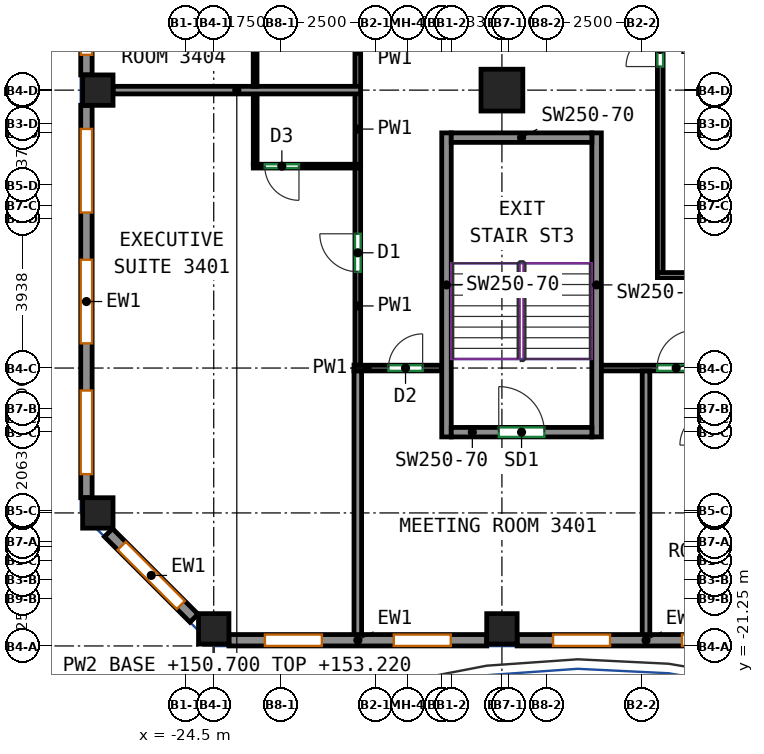
"""IFC4 building model, lengths in metres.
Left out: names, types, materials, properties, quantities, classifications, styles, units other than length and angle.
Written with IfcOpenShell. Run it as: python <this file> out.ifc"""

import sys

from ifc_helpers import new_model, si_unit, direction, frame, frame_2d, origin, origin_2d, place, context, subcontext, project, spatial, rectangle, extrude, source, transform, mapped, element, fill, save


model = new_model("IFC4")
c1 = context("Model", 3, precision=1e-05, world=origin(), true_north=direction((0.0, 1.0)))
c2 = subcontext(c1, "Body", "Model", "MODEL_VIEW")
j1 = project(units=[si_unit("LENGTHUNIT", "METRE"), si_unit("PLANEANGLEUNIT", "RADIAN")], contexts=[c1])
p1 = place(None, origin())
s1 = spatial("IfcSite", under=j1, at=p1, CompositionType="ELEMENT")
p2 = place(p1, origin())
s2 = spatial("IfcBuilding", under=s1, at=p2, CompositionType="ELEMENT")
p3 = place(p2, frame((0.0, 0.0, 150.7)))
s3 = spatial("IfcBuildingStorey", under=s2, at=p3, CompositionType="ELEMENT", Elevation=150.7)
m1 = source(origin(), c2, "Body", "SweptSolid", [
    extrude(rectangle(XDim=0.8, YDim=0.8, at=origin_2d()), origin(), (0.0, 0.0, 1.0), 3.12),
])
for number, where, z_axis, x_axis in (
    (1, (-26.8, -17.75, 0.0), (0.0, 0.0, 1.0), (1.0, 0.0, 0.0)),
    (2, (-26.8, -6.625, 0.0), (0.0, 0.0, 1.0), (1.0, 0.0, 0.0)),
    (3, (-23.75, -20.8, 0.0), (0.0, 0.0, 1.0), (1.0, 0.0, 0.0)),
    (4, (-16.167, -20.8, 0.0), (0.0, 0.0, 1.0), (1.0, 0.0, 0.0)),
):
    element("IfcColumn", number, at=place(p3, frame(where, z_axis=z_axis, x_axis=x_axis)), inside=s3, PredefinedType="COLUMN", context=c2, shape_type="MappedRepresentation", body=[
        mapped(m1, transform((0.0, 0.0, 0.0))),
    ])
m2 = source(origin(), c2, "Body", "SweptSolid", [
    extrude(rectangle(XDim=1.1, YDim=1.1, at=origin_2d()), origin(), (0.0, 0.0, 1.0), 3.12),
])
p4 = place(p3, frame((-16.167, -6.625, 0.0), z_axis=(0.0, 0.0, 1.0), x_axis=(1.0, 0.0, 0.0)))
e5 = element("IfcColumn", 5, at=p4, inside=s3, PredefinedType="COLUMN", context=c2, shape_type="MappedRepresentation", body=[
    mapped(m2, transform((0.0, 0.0, 0.0))),
])
m3 = source(origin(), c2, "Body", "SweptSolid", [
    extrude(rectangle(XDim=8.0, YDim=0.25, at=frame_2d((4.0, 0.0))), origin(), (0.0, 0.0, 1.0), 3.12),
])
for number, where, z_axis, x_axis in (
    (6, (-17.625, -15.75, 0.0), (0.0, 0.0, 1.0), (0.0, 1.0, 0.0)),
    (7, (-13.675, -15.75, 0.0), (0.0, 0.0, 1.0), (0.0, 1.0, 0.0)),
):
    element("IfcWall", number, at=place(p3, frame(where, z_axis=z_axis, x_axis=x_axis)), inside=s3, PredefinedType="SHEAR", context=c2, shape_type="MappedRepresentation", body=[
        mapped(m3, transform((0.0, 0.0, 0.0))),
    ])
m4 = source(origin(), c2, "Body", "SweptSolid", [
    extrude(rectangle(XDim=3.7, YDim=0.25, at=frame_2d((1.85, 0.0))), origin(), (0.0, 0.0, 1.0), 3.12),
])
p5 = place(p3, frame((-17.5, -15.625, 0.0), z_axis=(0.0, 0.0, 1.0), x_axis=(1.0, 0.0, 0.0)))
e8 = element("IfcWall", 8, at=p5, inside=s3, PredefinedType="SHEAR", context=c2, shape_type="MappedRepresentation", body=[
    mapped(m4, transform((0.0, 0.0, 0.0))),
])
p6 = place(p5, frame((1.25, 0.0, 0.0)))
e9 = element("IfcOpeningElement", 9, at=p6, cuts=e8, PredefinedType="OPENING", context=c2, shape_type="SweptSolid", body=[
    extrude(rectangle(XDim=1.2, YDim=2.1, at=frame_2d((0.6, 1.05))), frame((0.0, 0.135, 0.0), z_axis=(0.0, -1.0, 0.0), x_axis=(1.0, 0.0, 0.0)), (0.0, 0.0, 1.0), 0.27),
])
p7 = place(p3, frame((-17.5, -7.875, 0.0), z_axis=(0.0, 0.0, 1.0), x_axis=(1.0, 0.0, 0.0)))
e10 = element("IfcWall", 10, at=p7, inside=s3, PredefinedType="SHEAR", context=c2, shape_type="MappedRepresentation", body=[
    mapped(m4, transform((0.0, 0.0, 0.0))),
])
m5 = source(origin(), c2, "Body", "SweptSolid", [
    extrude(rectangle(XDim=6.783, YDim=0.3, at=frame_2d((3.392, 0.0))), origin(), (0.0, 0.0, 1.0), 3.12),
])
p8 = place(p3, frame((-23.35, -21.1, 0.0), z_axis=(0.0, 0.0, 1.0), x_axis=(1.0, 0.0, 0.0)))
e11 = element("IfcWall", 11, at=p8, inside=s3, PredefinedType="SOLIDWALL", context=c2, shape_type="MappedRepresentation", body=[
    mapped(m5, transform((0.0, 0.0, 0.0))),
])
p9 = place(p8, frame((0.946, 0.0, 0.85)))
e12 = element("IfcOpeningElement", 12, at=p9, cuts=e11, PredefinedType="OPENING", context=c2, shape_type="SweptSolid", body=[
    extrude(rectangle(XDim=1.5, YDim=1.95, at=frame_2d((0.75, 0.975))), frame((0.0, 0.16, 0.0), z_axis=(0.0, -1.0, 0.0), x_axis=(1.0, 0.0, 0.0)), (0.0, 0.0, 1.0), 0.32),
])
p10 = place(p8, frame((4.337, 0.0, 0.85)))
e13 = element("IfcOpeningElement", 13, at=p10, cuts=e11, PredefinedType="OPENING", context=c2, shape_type="SweptSolid", body=[
    extrude(rectangle(XDim=1.5, YDim=1.95, at=frame_2d((0.75, 0.975))), frame((0.0, 0.16, 0.0), z_axis=(0.0, -1.0, 0.0), x_axis=(1.0, 0.0, 0.0)), (0.0, 0.0, 1.0), 0.32),
])
m6 = source(origin(), c2, "Body", "SweptSolid", [
    extrude(rectangle(XDim=6.783, YDim=0.3, at=frame_2d((3.392, 0.0))), origin(), (0.0, 0.0, 1.0), 3.12),
])
p11 = place(p3, frame((-15.767, -21.1, 0.0), z_axis=(0.0, 0.0, 1.0), x_axis=(1.0, 0.0, 0.0)))
e14 = element("IfcWall", 14, at=p11, inside=s3, PredefinedType="SOLIDWALL", context=c2, shape_type="MappedRepresentation", body=[
    mapped(m6, transform((0.0, 0.0, 0.0))),
])
p12 = place(p11, frame((0.946, 0.0, 0.85)))
e15 = element("IfcOpeningElement", 15, at=p12, cuts=e14, PredefinedType="OPENING", context=c2, shape_type="SweptSolid", body=[
    extrude(rectangle(XDim=1.5, YDim=1.95, at=frame_2d((0.75, 0.975))), frame((0.0, 0.16, 0.0), z_axis=(0.0, -1.0, 0.0), x_axis=(1.0, 0.0, 0.0)), (0.0, 0.0, 1.0), 0.32),
])
p13 = place(p11, frame((4.338, 0.0, 0.85)))
e16 = element("IfcOpeningElement", 16, at=p13, cuts=e14, PredefinedType="OPENING", context=c2, shape_type="SweptSolid", body=[
    extrude(rectangle(XDim=1.5, YDim=1.95, at=frame_2d((0.75, 0.975))), frame((0.0, 0.16, 0.0), z_axis=(0.0, -1.0, 0.0), x_axis=(1.0, 0.0, 0.0)), (0.0, 0.0, 1.0), 0.32),
])
m7 = source(origin(), c2, "Body", "SweptSolid", [
    extrude(rectangle(XDim=6.513, YDim=0.3, at=frame_2d((3.256, 0.0))), origin(), (0.0, 0.0, 1.0), 3.12),
])
p14 = place(p3, frame((-27.1, 0.288, 0.0), z_axis=(0.0, 0.0, 1.0), x_axis=(0.0, -1.0, 0.0)))
e17 = element("IfcWall", 17, at=p14, inside=s3, PredefinedType="SOLIDWALL", context=c2, shape_type="MappedRepresentation", body=[
    mapped(m7, transform((0.0, 0.0, 0.0))),
])
p15 = place(p14, frame((0.528, 0.0, 0.85)))
e18 = element("IfcOpeningElement", 18, at=p15, cuts=e17, PredefinedType="OPENING", context=c2, shape_type="SweptSolid", body=[
    extrude(rectangle(XDim=2.2, YDim=1.95, at=frame_2d((1.1, 0.975))), frame((0.0, 0.16, 0.0), z_axis=(0.0, -1.0, 0.0), x_axis=(1.0, 0.0, 0.0)), (0.0, 0.0, 1.0), 0.32),
])
p16 = place(p14, frame((3.784, 0.0, 0.85)))
e19 = element("IfcOpeningElement", 19, at=p16, cuts=e17, PredefinedType="OPENING", context=c2, shape_type="SweptSolid", body=[
    extrude(rectangle(XDim=2.2, YDim=1.95, at=frame_2d((1.1, 0.975))), frame((0.0, 0.16, 0.0), z_axis=(0.0, -1.0, 0.0), x_axis=(1.0, 0.0, 0.0)), (0.0, 0.0, 1.0), 0.32),
])
m8 = source(origin(), c2, "Body", "SweptSolid", [
    extrude(rectangle(XDim=10.325, YDim=0.3, at=frame_2d((5.163, 0.0))), origin(), (0.0, 0.0, 1.0), 3.12),
])
p17 = place(p3, frame((-27.1, -7.025, 0.0), z_axis=(0.0, 0.0, 1.0), x_axis=(0.0, -1.0, 0.0)))
e20 = element("IfcWall", 20, at=p17, inside=s3, PredefinedType="SOLIDWALL", context=c2, shape_type="MappedRepresentation", body=[
    mapped(m8, transform((0.0, 0.0, 0.0))),
])
p18 = place(p17, frame((0.621, 0.0, 0.85)))
e21 = element("IfcOpeningElement", 21, at=p18, cuts=e20, PredefinedType="OPENING", context=c2, shape_type="SweptSolid", body=[
    extrude(rectangle(XDim=2.2, YDim=1.95, at=frame_2d((1.1, 0.975))), frame((0.0, 0.16, 0.0), z_axis=(0.0, -1.0, 0.0), x_axis=(1.0, 0.0, 0.0)), (0.0, 0.0, 1.0), 0.32),
])
p19 = place(p17, frame((4.062, 0.0, 0.85)))
e22 = element("IfcOpeningElement", 22, at=p19, cuts=e20, PredefinedType="OPENING", context=c2, shape_type="SweptSolid", body=[
    extrude(rectangle(XDim=2.2, YDim=1.95, at=frame_2d((1.1, 0.975))), frame((0.0, 0.16, 0.0), z_axis=(0.0, -1.0, 0.0), x_axis=(1.0, 0.0, 0.0)), (0.0, 0.0, 1.0), 0.32),
])
p20 = place(p17, frame((7.504, 0.0, 0.85)))
e23 = element("IfcOpeningElement", 23, at=p20, cuts=e20, PredefinedType="OPENING", context=c2, shape_type="SweptSolid", body=[
    extrude(rectangle(XDim=2.2, YDim=1.95, at=frame_2d((1.1, 0.975))), frame((0.0, 0.16, 0.0), z_axis=(0.0, -1.0, 0.0), x_axis=(1.0, 0.0, 0.0)), (0.0, 0.0, 1.0), 0.32),
])
m9 = source(origin(), c2, "Body", "SweptSolid", [
    extrude(rectangle(XDim=3.182, YDim=0.3, at=frame_2d((1.591, 0.0))), origin(), (0.0, 0.0, 1.0), 3.12),
])
p21 = place(p3, frame((-26.519, -18.269, 0.0), z_axis=(0.0, 0.0, 1.0), x_axis=(0.707068419229, -0.707145141063, 0.0)))
e24 = element("IfcWall", 24, at=p21, inside=s3, PredefinedType="SOLIDWALL", context=c2, shape_type="MappedRepresentation", body=[
    mapped(m9, transform((0.0, 0.0, 0.0))),
])
p22 = place(p21, frame((0.491, 0.0, 0.85)))
e25 = element("IfcOpeningElement", 25, at=p22, cuts=e24, PredefinedType="OPENING", context=c2, shape_type="SweptSolid", body=[
    extrude(rectangle(XDim=2.2, YDim=1.95, at=frame_2d((1.1, 0.975))), frame((0.0, 0.16, 0.0), z_axis=(0.0, -1.0, 0.0), x_axis=(1.0, 0.0, 0.0)), (0.0, 0.0, 1.0), 0.32),
])
p23 = place(p3, frame((-13.55, -13.938, 0.0), z_axis=(0.0, 0.0, 1.0), x_axis=(1.0, 0.0, 0.0)))
e26 = element("IfcWall", 26, at=p23, inside=s3, PredefinedType="PARTITIONING", context=c2, shape_type="SweptSolid", body=[
    extrude(rectangle(XDim=4.417, YDim=0.15, at=frame_2d((2.208, 0.0))), origin(), (0.0, 0.0, 1.0), 3.12),
])
p24 = place(p23, frame((1.468, 0.0, 0.0)))
e27 = element("IfcOpeningElement", 27, at=p24, cuts=e26, PredefinedType="OPENING", context=c2, shape_type="SweptSolid", body=[
    extrude(rectangle(XDim=1.0, YDim=2.1, at=frame_2d((0.5, 1.05))), frame((0.0, 0.085, 0.0), z_axis=(0.0, -1.0, 0.0), x_axis=(1.0, 0.0, 0.0)), (0.0, 0.0, 1.0), 0.17),
])
p25 = place(p3, frame((-20.059, -13.938, 0.0), z_axis=(0.0, 0.0, 1.0), x_axis=(1.0, 0.0, 0.0)))
e28 = element("IfcWall", 28, at=p25, inside=s3, PredefinedType="PARTITIONING", context=c2, shape_type="SweptSolid", body=[
    extrude(rectangle(XDim=2.309, YDim=0.15, at=frame_2d((1.155, 0.0))), origin(), (0.0, 0.0, 1.0), 3.12),
])
p26 = place(p25, frame((0.906, 0.0, 0.0)))
e29 = element("IfcOpeningElement", 29, at=p26, cuts=e28, PredefinedType="OPENING", context=c2, shape_type="SweptSolid", body=[
    extrude(rectangle(XDim=0.9, YDim=2.1, at=frame_2d((0.45, 1.05))), frame((0.0, 0.085, 0.0), z_axis=(0.0, -1.0, 0.0), x_axis=(1.0, 0.0, 0.0)), (0.0, 0.0, 1.0), 0.17),
])
p27 = place(p3, frame((-19.959, -13.863, 0.0), z_axis=(0.0, 0.0, 1.0), x_axis=(0.0, 1.0, 0.0)))
e30 = element("IfcWall", 30, at=p27, inside=s3, PredefinedType="PARTITIONING", context=c2, shape_type="SweptSolid", body=[
    extrude(rectangle(XDim=5.198, YDim=0.15, at=frame_2d((2.599, 0.0))), origin(), (0.0, 0.0, 1.0), 3.12),
])
p28 = place(p27, frame((2.458, 0.0, 0.0)))
e31 = element("IfcOpeningElement", 31, at=p28, cuts=e30, PredefinedType="OPENING", context=c2, shape_type="SweptSolid", body=[
    extrude(rectangle(XDim=1.0, YDim=2.1, at=frame_2d((0.5, 1.05))), frame((0.0, 0.085, 0.0), z_axis=(0.0, -1.0, 0.0), x_axis=(1.0, 0.0, 0.0)), (0.0, 0.0, 1.0), 0.17),
])
for number, where, z_axis, x_axis in (
    (32, (-19.959, -8.585, 0.0), (0.0, 0.0, 1.0), (0.0, 1.0, 0.0)),
    (33, (-19.959, -6.535, 0.0), (0.0, 0.0, 1.0), (0.0, 1.0, 0.0)),
):
    element("IfcWall", number, at=place(p3, frame(where, z_axis=z_axis, x_axis=x_axis)), inside=s3, PredefinedType="PARTITIONING", context=c2, shape_type="SweptSolid", body=[
        extrude(rectangle(XDim=1.87, YDim=0.15, at=frame_2d((0.935, 0.0))), origin(), (0.0, 0.0, 1.0), 3.12),
    ])
p29 = place(p3, frame((-12.0, -11.425, 0.0), z_axis=(0.0, 0.0, 1.0), x_axis=(0.0, 1.0, 0.0)))
e34 = element("IfcWall", 34, at=p29, inside=s3, PredefinedType="PARTITIONING", context=c2, shape_type="SweptSolid", body=[
    extrude(rectangle(XDim=14.55, YDim=0.15, at=frame_2d((7.275, 0.0))), origin(), (0.0, 0.0, 1.0), 3.12),
])
p30 = place(p29, frame((5.42, 0.0, 0.0)))
e35 = element("IfcOpeningElement", 35, at=p30, cuts=e34, PredefinedType="OPENING", context=c2, shape_type="SweptSolid", body=[
    extrude(rectangle(XDim=0.9, YDim=2.1, at=frame_2d((0.45, 1.05))), frame((0.0, 0.085, 0.0), z_axis=(0.0, -1.0, 0.0), x_axis=(1.0, 0.0, 0.0)), (0.0, 0.0, 1.0), 0.17),
])
p31 = place(p3, frame((-12.075, -11.5, 0.0), z_axis=(0.0, 0.0, 1.0), x_axis=(1.0, 0.0, 0.0)))
e36 = element("IfcWall", 36, at=p31, inside=s3, PredefinedType="PARTITIONING", context=c2, shape_type="SweptSolid", body=[
    extrude(rectangle(XDim=28.35, YDim=0.15, at=frame_2d((14.175, 0.0))), origin(), (0.0, 0.0, 1.0), 3.12),
])
p32 = place(p31, frame((11.273, 0.0, 0.0)))
e37 = element("IfcOpeningElement", 37, at=p32, cuts=e36, PredefinedType="OPENING", context=c2, shape_type="SweptSolid", body=[
    extrude(rectangle(XDim=0.9, YDim=2.1, at=frame_2d((0.45, 1.05))), frame((0.0, 0.085, 0.0), z_axis=(0.0, -1.0, 0.0), x_axis=(1.0, 0.0, 0.0)), (0.0, 0.0, 1.0), 0.17),
])
for number, where, z_axis, x_axis in (
    (38, (-12.375, -21.0, 0.0), (0.0, 0.0, 1.0), (0.0, 1.0, 0.0)),
    (39, (-19.959, -21.0, 0.0), (0.0, 0.0, 1.0), (0.0, 1.0, 0.0)),
):
    element("IfcWall", number, at=place(p3, frame(where, z_axis=z_axis, x_axis=x_axis)), inside=s3, PredefinedType="PARTITIONING", context=c2, shape_type="SweptSolid", body=[
        extrude(rectangle(XDim=6.985, YDim=0.2, at=frame_2d((3.493, 0.0))), origin(), (0.0, 0.0, 1.0), 3.12),
    ])
p33 = place(p3, frame((-22.659, -8.575, 0.0), z_axis=(0.0, 0.0, 1.0), x_axis=(0.0, 1.0, 0.0)))
e40 = element("IfcWall", 40, at=p33, inside=s3, PredefinedType="PARTITIONING", context=c2, shape_type="SweptSolid", body=[
    extrude(rectangle(XDim=1.85, YDim=0.1, at=frame_2d((0.925, 0.0))), origin(), (0.0, 0.0, 1.0), 3.12),
])
p34 = place(p3, frame((-19.886, -8.625, 0.0), z_axis=(0.0, 0.0, 1.0), x_axis=(-1.0, 0.0, 0.0)))
e41 = element("IfcWall", 41, at=p34, inside=s3, PredefinedType="PARTITIONING", context=c2, shape_type="SweptSolid", body=[
    extrude(rectangle(XDim=2.823, YDim=0.1, at=frame_2d((1.412, 0.0))), origin(), (0.0, 0.0, 1.0), 3.12),
])
p35 = place(p34, frame((1.621, 0.0, 0.0)))
e42 = element("IfcOpeningElement", 42, at=p35, cuts=e41, PredefinedType="OPENING", context=c2, shape_type="SweptSolid", body=[
    extrude(rectangle(XDim=0.9, YDim=2.1, at=frame_2d((0.45, 1.05))), frame((0.0, 0.06, 0.0), z_axis=(0.0, -1.0, 0.0), x_axis=(1.0, 0.0, 0.0)), (0.0, 0.0, 1.0), 0.12),
])
p36 = place(p3, frame((-26.4, -6.625, 0.0), z_axis=(0.0, 0.0, 1.0), x_axis=(1.0, 0.0, 0.0)))
e43 = element("IfcWall", 43, at=p36, inside=s3, PredefinedType="PARTITIONING", context=c2, shape_type="SweptSolid", body=[
    extrude(rectangle(XDim=6.514, YDim=0.2, at=frame_2d((3.257, 0.0))), origin(), (0.0, 0.0, 1.0), 2.52),
])
p37 = place(p3, frame((-22.661, -6.525, 0.0), z_axis=(0.0, 0.0, 1.0), x_axis=(0.0, 1.0, 0.0)))
e44 = element("IfcWall", 44, at=p37, inside=s3, PredefinedType="PARTITIONING", context=c2, shape_type="SweptSolid", body=[
    extrude(rectangle(XDim=1.85, YDim=0.1, at=frame_2d((0.925, 0.0))), origin(), (0.0, 0.0, 1.0), 3.12),
])
p38 = place(p9, origin())
e45 = element("IfcWindow", 45, at=p38, inside=s3, PartitioningType="SINGLE_PANEL", PredefinedType="WINDOW", context=c2, shape_type="SweptSolid", body=[
    extrude(rectangle(XDim=1.5, YDim=1.95, at=frame_2d((0.75, 0.975))), frame((0.0, 0.03, 0.0), z_axis=(0.0, -1.0, 0.0), x_axis=(1.0, 0.0, 0.0)), (0.0, 0.0, 1.0), 0.06),
])
fill(e12, e45)
p39 = place(p10, origin())
e46 = element("IfcWindow", 46, at=p39, inside=s3, PartitioningType="SINGLE_PANEL", PredefinedType="WINDOW", context=c2, shape_type="SweptSolid", body=[
    extrude(rectangle(XDim=1.5, YDim=1.95, at=frame_2d((0.75, 0.975))), frame((0.0, 0.03, 0.0), z_axis=(0.0, -1.0, 0.0), x_axis=(1.0, 0.0, 0.0)), (0.0, 0.0, 1.0), 0.06),
])
fill(e13, e46)
p40 = place(p12, origin())
e47 = element("IfcWindow", 47, at=p40, inside=s3, PartitioningType="SINGLE_PANEL", PredefinedType="WINDOW", context=c2, shape_type="SweptSolid", body=[
    extrude(rectangle(XDim=1.5, YDim=1.95, at=frame_2d((0.75, 0.975))), frame((0.0, 0.03, 0.0), z_axis=(0.0, -1.0, 0.0), x_axis=(1.0, 0.0, 0.0)), (0.0, 0.0, 1.0), 0.06),
])
fill(e15, e47)
p41 = place(p13, origin())
e48 = element("IfcWindow", 48, at=p41, inside=s3, PartitioningType="SINGLE_PANEL", PredefinedType="WINDOW", context=c2, shape_type="SweptSolid", body=[
    extrude(rectangle(XDim=1.5, YDim=1.95, at=frame_2d((0.75, 0.975))), frame((0.0, 0.03, 0.0), z_axis=(0.0, -1.0, 0.0), x_axis=(1.0, 0.0, 0.0)), (0.0, 0.0, 1.0), 0.06),
])
fill(e16, e48)
p42 = place(p16, origin())
e49 = element("IfcWindow", 49, at=p42, inside=s3, PartitioningType="SINGLE_PANEL", PredefinedType="WINDOW", context=c2, shape_type="SweptSolid", body=[
    extrude(rectangle(XDim=2.2, YDim=1.95, at=frame_2d((1.1, 0.975))), frame((0.0, 0.03, 0.0), z_axis=(0.0, -1.0, 0.0), x_axis=(1.0, 0.0, 0.0)), (0.0, 0.0, 1.0), 0.06),
])
fill(e19, e49)
p43 = place(p18, origin())
e50 = element("IfcWindow", 50, at=p43, inside=s3, PartitioningType="SINGLE_PANEL", PredefinedType="WINDOW", context=c2, shape_type="SweptSolid", body=[
    extrude(rectangle(XDim=2.2, YDim=1.95, at=frame_2d((1.1, 0.975))), frame((0.0, 0.03, 0.0), z_axis=(0.0, -1.0, 0.0), x_axis=(1.0, 0.0, 0.0)), (0.0, 0.0, 1.0), 0.06),
])
fill(e21, e50)
p44 = place(p19, origin())
e51 = element("IfcWindow", 51, at=p44, inside=s3, PartitioningType="SINGLE_PANEL", PredefinedType="WINDOW", context=c2, shape_type="SweptSolid", body=[
    extrude(rectangle(XDim=2.2, YDim=1.95, at=frame_2d((1.1, 0.975))), frame((0.0, 0.03, 0.0), z_axis=(0.0, -1.0, 0.0), x_axis=(1.0, 0.0, 0.0)), (0.0, 0.0, 1.0), 0.06),
])
fill(e22, e51)
p45 = place(p20, origin())
e52 = element("IfcWindow", 52, at=p45, inside=s3, PartitioningType="SINGLE_PANEL", PredefinedType="WINDOW", context=c2, shape_type="SweptSolid", body=[
    extrude(rectangle(XDim=2.2, YDim=1.95, at=frame_2d((1.1, 0.975))), frame((0.0, 0.03, 0.0), z_axis=(0.0, -1.0, 0.0), x_axis=(1.0, 0.0, 0.0)), (0.0, 0.0, 1.0), 0.06),
])
fill(e23, e52)
p46 = place(p22, origin())
e53 = element("IfcWindow", 53, at=p46, inside=s3, PartitioningType="SINGLE_PANEL", PredefinedType="WINDOW", context=c2, shape_type="SweptSolid", body=[
    extrude(rectangle(XDim=2.2, YDim=1.95, at=frame_2d((1.1, 0.975))), frame((0.0, 0.03, 0.0), z_axis=(0.0, -1.0, 0.0), x_axis=(1.0, 0.0, 0.0)), (0.0, 0.0, 1.0), 0.06),
])
fill(e25, e53)
p47 = place(p6, origin())
e54 = element("IfcDoor", 54, at=p47, inside=s3, OperationType="DOUBLE_DOOR_SINGLE_SWING", PredefinedType="DOOR", context=c2, shape_type="SweptSolid", body=[
    extrude(rectangle(XDim=1.2, YDim=2.1, at=frame_2d((0.6, 1.05))), frame((0.0, 0.025, 0.0), z_axis=(0.0, -1.0, 0.0), x_axis=(1.0, 0.0, 0.0)), (0.0, 0.0, 1.0), 0.05),
])
fill(e9, e54)
p48 = place(p26, origin())
e55 = element("IfcDoor", 55, at=p48, inside=s3, OperationType="SINGLE_SWING_RIGHT", PredefinedType="DOOR", context=c2, shape_type="SweptSolid", body=[
    extrude(rectangle(XDim=0.9, YDim=2.1, at=frame_2d((0.45, 1.05))), frame((0.0, 0.025, 0.0), z_axis=(0.0, -1.0, 0.0), x_axis=(1.0, 0.0, 0.0)), (0.0, 0.0, 1.0), 0.05),
])
fill(e29, e55)
p49 = place(p24, origin())
e56 = element("IfcDoor", 56, at=p49, inside=s3, OperationType="SINGLE_SWING_RIGHT", PredefinedType="DOOR", context=c2, shape_type="SweptSolid", body=[
    extrude(rectangle(XDim=1.0, YDim=2.1, at=frame_2d((0.5, 1.05))), frame((0.0, 0.025, 0.0), z_axis=(0.0, -1.0, 0.0), x_axis=(1.0, 0.0, 0.0)), (0.0, 0.0, 1.0), 0.05),
])
fill(e27, e56)
p50 = place(p28, origin())
e57 = element("IfcDoor", 57, at=p50, inside=s3, OperationType="SINGLE_SWING_RIGHT", PredefinedType="DOOR", context=c2, shape_type="SweptSolid", body=[
    extrude(rectangle(XDim=1.0, YDim=2.1, at=frame_2d((0.5, 1.05))), frame((0.0, 0.025, 0.0), z_axis=(0.0, -1.0, 0.0), x_axis=(1.0, 0.0, 0.0)), (0.0, 0.0, 1.0), 0.05),
])
fill(e31, e57)
p51 = place(p35, origin())
e58 = element("IfcDoor", 58, at=p51, inside=s3, OperationType="SINGLE_SWING_LEFT", PredefinedType="DOOR", context=c2, shape_type="SweptSolid", body=[
    extrude(rectangle(XDim=0.9, YDim=2.1, at=frame_2d((0.45, 1.05))), frame((0.0, 0.025, 0.0), z_axis=(0.0, -1.0, 0.0), x_axis=(1.0, 0.0, 0.0)), (0.0, 0.0, 1.0), 0.05),
])
fill(e42, e58)
p52 = place(p30, origin())
e59 = element("IfcDoor", 59, at=p52, inside=s3, OperationType="SINGLE_SWING_LEFT", PredefinedType="DOOR", context=c2, shape_type="SweptSolid", body=[
    extrude(rectangle(XDim=0.9, YDim=2.1, at=frame_2d((0.45, 1.05))), frame((0.0, 0.025, 0.0), z_axis=(0.0, -1.0, 0.0), x_axis=(1.0, 0.0, 0.0)), (0.0, 0.0, 1.0), 0.05),
])
fill(e35, e59)
save(model, sys.argv[1])
